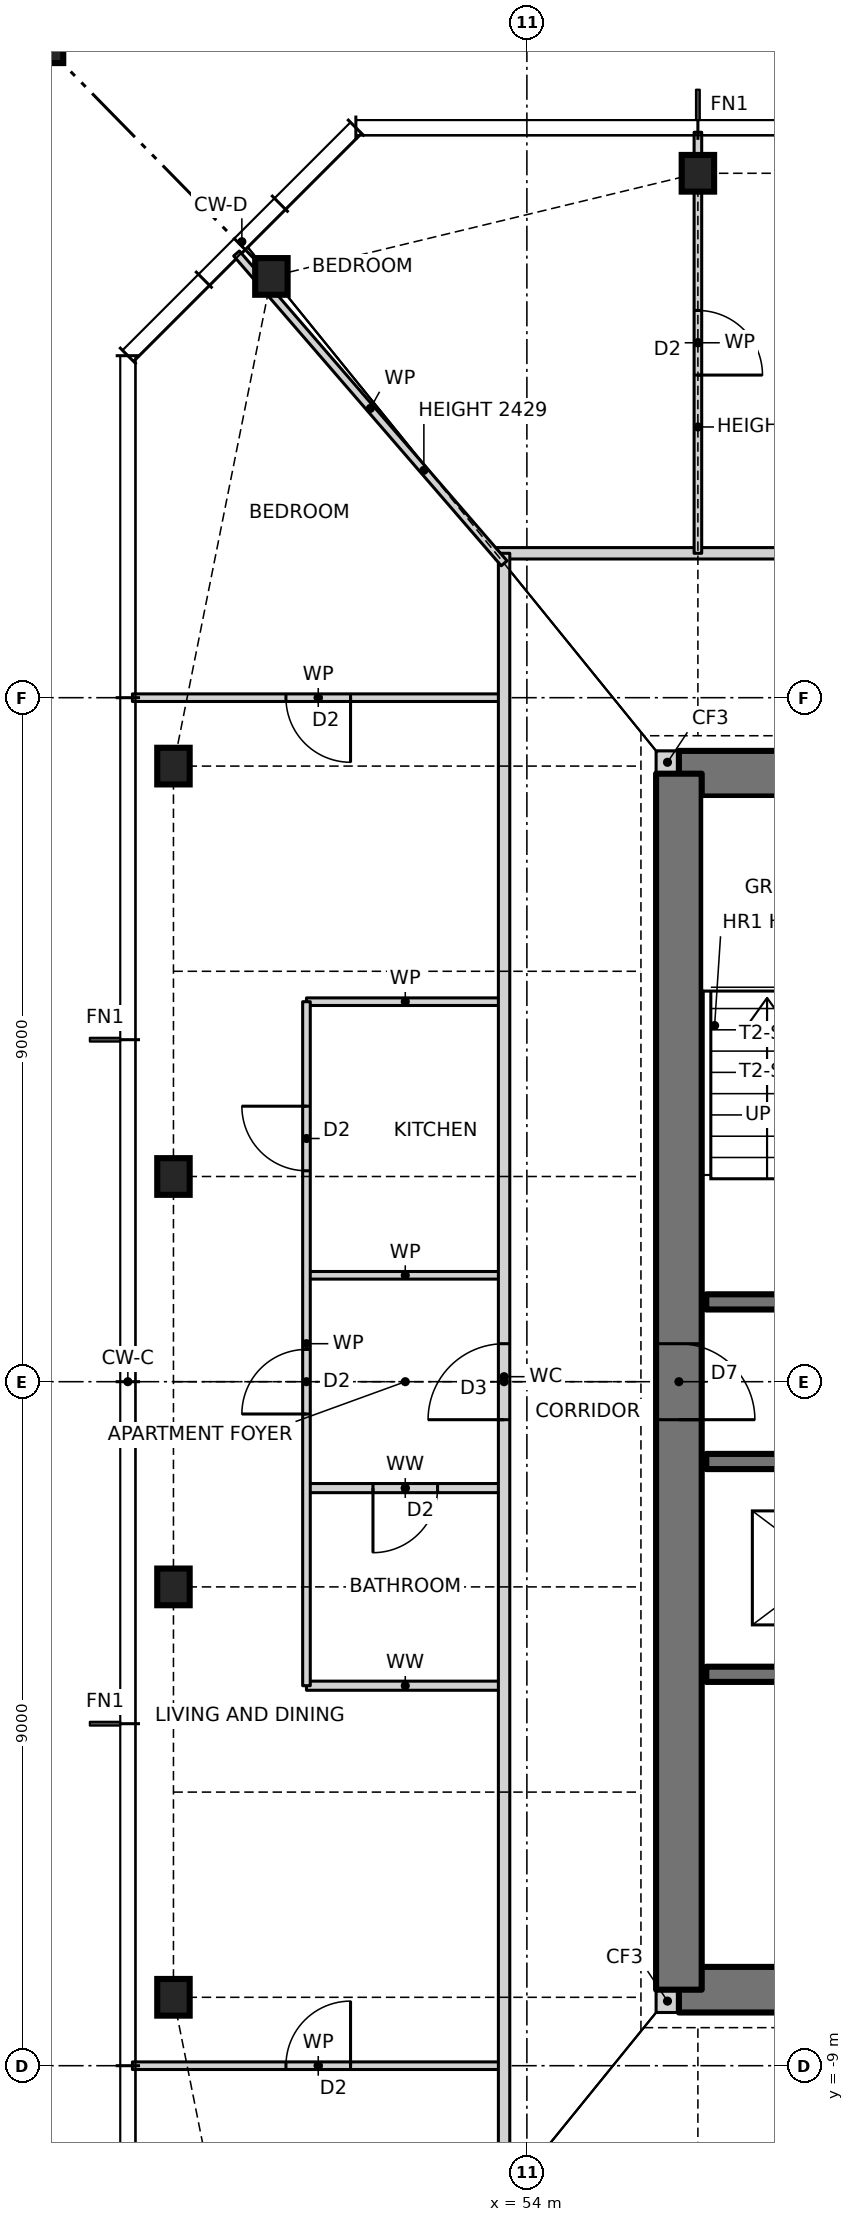
"""IFC4 building model, lengths in metres.
Left out: names, types, materials, properties, quantities, classifications, styles, units other than length and angle.
Written with IfcOpenShell. Run it as: python <this file> out.ifc"""

import sys

from ifc_helpers import new_model, si_unit, direction, frame, frame_2d, origin, origin_2d, place, context, subcontext, project, spatial, rectangle, hollow_rectangle, i_section, extrude, element, fill, save


model = new_model("IFC4")
c1 = context("Model", 3, precision=1e-05, world=origin(), true_north=direction((0.0, 1.0)))
c2 = subcontext(c1, "Body", "Model", "MODEL_VIEW")
j1 = project(units=[si_unit("LENGTHUNIT", "METRE"), si_unit("PLANEANGLEUNIT", "RADIAN")], contexts=[c1])
p1 = place(None, origin())
s1 = spatial("IfcSite", under=j1, at=p1, CompositionType="ELEMENT")
p2 = place(p1, origin())
s2 = spatial("IfcBuilding", under=s1, at=p2, CompositionType="ELEMENT")
p3 = place(p2, frame((0.0, 0.0, 101.5)))
s3 = spatial("IfcBuildingStorey", under=s2, at=p3, CompositionType="ELEMENT", Elevation=101.5)
for number, where, z_axis, x_axis in (
    (1, (56.25, 15.9, 0.0), (0.0, 0.0, 1.0), (1.0, 0.0, 0.0)),
    (2, (50.639, 14.543, 0.0), (0.0, 0.0, 1.0), (1.0, 0.0, 0.0)),
    (3, (49.35, 8.1, 0.0), (0.0, 0.0, 1.0), (1.0, 0.0, 0.0)),
    (4, (49.35, 2.7, 0.0), (0.0, 0.0, 1.0), (1.0, 0.0, 0.0)),
    (5, (49.35, -2.7, 0.0), (0.0, 0.0, 1.0), (1.0, 0.0, 0.0)),
    (6, (49.35, -8.1, 0.0), (0.0, 0.0, 1.0), (1.0, 0.0, 0.0)),
):
    element("IfcColumn", number, at=place(p3, frame(where, z_axis=z_axis, x_axis=x_axis)), inside=s3, PredefinedType="COLUMN", context=c2, shape_type="SweptSolid", body=[
        extrude(i_section(OverallWidth=0.427, OverallDepth=0.483, WebThickness=0.051, FlangeThickness=0.082, at=origin_2d()), origin(), (0.0, 0.0, 1.0), 3.5),
    ])
p4 = place(p3, frame((47.35, 17.9, 0.0), z_axis=(0.0, 0.0, 1.0), x_axis=(1.0, 0.0, 0.0)))
e7 = element("IfcColumn", 7, at=p4, inside=s3, PredefinedType="COLUMN", context=c2, shape_type="SweptSolid", body=[
    extrude(hollow_rectangle(XDim=1.1, YDim=1.1, WallThickness=0.06, at=origin_2d()), origin(), (0.0, 0.0, 1.0), 3.5),
])
for number, where, z_axis, x_axis in (
    (8, (55.7, -8.15, 0.0), (0.0, 0.0, 1.0), (1.0, 0.0, 0.0)),
    (9, (55.7, 8.15, 0.0), (0.0, 0.0, 1.0), (1.0, 0.0, 0.0)),
):
    element("IfcWall", number, at=place(p3, frame(where, z_axis=z_axis, x_axis=x_axis)), inside=s3, PredefinedType="SOLIDWALL", context=c2, shape_type="SweptSolid", body=[
        extrude(rectangle(XDim=0.3, YDim=0.3, at=frame_2d((0.15, 0.0))), origin(), (0.0, 0.0, 1.0), 3.5),
    ])
p5 = place(p3, frame((56.0, -8.0, 0.0), z_axis=(0.0, 0.0, 1.0), x_axis=(1.0, 0.0, 0.0)))
e10 = element("IfcWall", 10, at=p5, inside=s3, PredefinedType="SHEAR", context=c2, shape_type="SweptSolid", body=[
    extrude(rectangle(XDim=14.0, YDim=0.6, at=frame_2d((7.0, 0.0))), origin(), (0.0, 0.0, 1.0), 3.5),
])
p6 = place(p5, frame((2.7, 0.0, 0.0)))
e11 = element("IfcOpeningElement", 11, at=p6, cuts=e10, PredefinedType="OPENING", context=c2, shape_type="SweptSolid", body=[
    extrude(rectangle(XDim=0.9, YDim=2.1, at=frame_2d((0.45, 1.05))), frame((0.0, 0.31, 0.0), z_axis=(0.0, -1.0, 0.0), x_axis=(1.0, 0.0, 0.0)), (0.0, 0.0, 1.0), 0.62),
])
p7 = place(p5, frame((7.7, 0.0, 0.0)))
e12 = element("IfcOpeningElement", 12, at=p7, cuts=e10, PredefinedType="OPENING", context=c2, shape_type="SweptSolid", body=[
    extrude(rectangle(XDim=0.9, YDim=2.1, at=frame_2d((0.45, 1.05))), frame((0.0, 0.31, 0.0), z_axis=(0.0, -1.0, 0.0), x_axis=(1.0, 0.0, 0.0)), (0.0, 0.0, 1.0), 0.62),
])
p8 = place(p3, frame((70.0, 8.0, 0.0), z_axis=(0.0, 0.0, 1.0), x_axis=(-1.0, 0.0, 0.0)))
e13 = element("IfcWall", 13, at=p8, inside=s3, PredefinedType="SHEAR", context=c2, shape_type="SweptSolid", body=[
    extrude(rectangle(XDim=14.0, YDim=0.6, at=frame_2d((7.0, 0.0))), origin(), (0.0, 0.0, 1.0), 3.5),
])
p9 = place(p8, frame((8.2, 0.0, 0.0)))
e14 = element("IfcOpeningElement", 14, at=p9, cuts=e13, PredefinedType="OPENING", context=c2, shape_type="SweptSolid", body=[
    extrude(rectangle(XDim=0.9, YDim=2.1, at=frame_2d((0.45, 1.05))), frame((0.0, 0.31, 0.0), z_axis=(0.0, -1.0, 0.0), x_axis=(1.0, 0.0, 0.0)), (0.0, 0.0, 1.0), 0.62),
])
p10 = place(p8, frame((3.2, 0.0, 0.0)))
e15 = element("IfcOpeningElement", 15, at=p10, cuts=e13, PredefinedType="OPENING", context=c2, shape_type="SweptSolid", body=[
    extrude(rectangle(XDim=0.9, YDim=2.1, at=frame_2d((0.45, 1.05))), frame((0.0, 0.31, 0.0), z_axis=(0.0, -1.0, 0.0), x_axis=(1.0, 0.0, 0.0)), (0.0, 0.0, 1.0), 0.62),
])
p11 = place(p3, frame((56.0, 8.0, 0.0), z_axis=(0.0, 0.0, 1.0), x_axis=(0.0, -1.0, 0.0)))
e16 = element("IfcWall", 16, at=p11, inside=s3, PredefinedType="SHEAR", context=c2, shape_type="SweptSolid", body=[
    extrude(rectangle(XDim=16.0, YDim=0.6, at=frame_2d((8.0, 0.0))), origin(), (0.0, 0.0, 1.0), 3.5),
])
p12 = place(p11, frame((7.5, 0.0, 0.0)))
e17 = element("IfcOpeningElement", 17, at=p12, cuts=e16, PredefinedType="OPENING", context=c2, shape_type="SweptSolid", body=[
    extrude(rectangle(XDim=1.0, YDim=2.1, at=frame_2d((0.5, 1.05))), frame((0.0, 0.31, 0.0), z_axis=(0.0, -1.0, 0.0), x_axis=(1.0, 0.0, 0.0)), (0.0, 0.0, 1.0), 0.62),
])
p13 = place(p3, frame((48.81, -9.0, 0.0), z_axis=(0.0, 0.0, 1.0), x_axis=(1.0, 0.0, 0.0)))
e18 = element("IfcWall", 18, at=p13, inside=s3, PredefinedType="PARTITIONING", context=c2, shape_type="SweptSolid", body=[
    extrude(rectangle(XDim=4.89, YDim=0.1, at=frame_2d((2.445, 0.0))), origin(), (0.0, 0.0, 1.0), 3.27),
])
p14 = place(p13, frame((2.02, 0.0, 0.0)))
e19 = element("IfcOpeningElement", 19, at=p14, cuts=e18, PredefinedType="OPENING", context=c2, shape_type="SweptSolid", body=[
    extrude(rectangle(XDim=0.85, YDim=2.1, at=frame_2d((0.425, 1.05))), frame((0.0, 0.06, 0.0), z_axis=(0.0, -1.0, 0.0), x_axis=(1.0, 0.0, 0.0)), (0.0, 0.0, 1.0), 0.12),
])
p15 = place(p3, frame((51.1, -4.0, 0.0), z_axis=(0.0, 0.0, 1.0), x_axis=(1.0, 0.0, 0.0)))
e20 = element("IfcWall", 20, at=p15, inside=s3, PredefinedType="PARTITIONING", context=c2, shape_type="SweptSolid", body=[
    extrude(rectangle(XDim=2.6, YDim=0.12, at=frame_2d((1.3, 0.0))), origin(), (0.0, 0.0, 1.0), 3.27),
])
p16 = place(p3, frame((56.36, -3.85, 0.0), z_axis=(0.0, 0.0, 1.0), x_axis=(1.0, 0.0, 0.0)))
e21 = element("IfcWall", 21, at=p16, inside=s3, PredefinedType="SOLIDWALL", context=c2, shape_type="SweptSolid", body=[
    extrude(rectangle(XDim=9.94, YDim=0.2, at=frame_2d((4.97, 0.0))), origin(), (0.0, 0.0, 1.0), 3.5),
])
p17 = place(p3, frame((51.1, -1.4, 0.0), z_axis=(0.0, 0.0, 1.0), x_axis=(1.0, 0.0, 0.0)))
e22 = element("IfcWall", 22, at=p17, inside=s3, PredefinedType="PARTITIONING", context=c2, shape_type="SweptSolid", body=[
    extrude(rectangle(XDim=2.6, YDim=0.12, at=frame_2d((1.3, 0.0))), origin(), (0.0, 0.0, 1.0), 3.27),
])
p18 = place(p17, frame((0.875, 0.0, 0.0)))
e23 = element("IfcOpeningElement", 23, at=p18, cuts=e22, PredefinedType="OPENING", context=c2, shape_type="SweptSolid", body=[
    extrude(rectangle(XDim=0.85, YDim=2.1, at=frame_2d((0.425, 1.05))), frame((0.0, 0.07, 0.0), z_axis=(0.0, -1.0, 0.0), x_axis=(1.0, 0.0, 0.0)), (0.0, 0.0, 1.0), 0.14),
])
p19 = place(p3, frame((56.36, -1.05, 0.0), z_axis=(0.0, 0.0, 1.0), x_axis=(1.0, 0.0, 0.0)))
e24 = element("IfcWall", 24, at=p19, inside=s3, PredefinedType="SOLIDWALL", context=c2, shape_type="SweptSolid", body=[
    extrude(rectangle(XDim=13.28, YDim=0.2, at=frame_2d((6.64, 0.0))), origin(), (0.0, 0.0, 1.0), 3.5),
])
p20 = place(p19, frame((11.11, 0.0, 0.0)))
e25 = element("IfcOpeningElement", 25, at=p20, cuts=e24, PredefinedType="OPENING", context=c2, shape_type="SweptSolid", body=[
    extrude(rectangle(XDim=1.0, YDim=2.1, at=frame_2d((0.5, 1.05))), frame((0.0, 0.11, 0.0), z_axis=(0.0, -1.0, 0.0), x_axis=(1.0, 0.0, 0.0)), (0.0, 0.0, 1.0), 0.22),
])
p21 = place(p19, frame((1.087, 0.0, 0.0)))
e26 = element("IfcOpeningElement", 26, at=p21, cuts=e24, PredefinedType="OPENING", context=c2, shape_type="SweptSolid", body=[
    extrude(rectangle(XDim=1.1, YDim=2.1, at=frame_2d((0.55, 1.05))), frame((0.0, 0.11, 0.0), z_axis=(0.0, -1.0, 0.0), x_axis=(1.0, 0.0, 0.0)), (0.0, 0.0, 1.0), 0.22),
])
p22 = place(p19, frame((4.39, 0.0, 0.0)))
e27 = element("IfcOpeningElement", 27, at=p22, cuts=e24, PredefinedType="OPENING", context=c2, shape_type="SweptSolid", body=[
    extrude(rectangle(XDim=1.1, YDim=2.1, at=frame_2d((0.55, 1.05))), frame((0.0, 0.11, 0.0), z_axis=(0.0, -1.0, 0.0), x_axis=(1.0, 0.0, 0.0)), (0.0, 0.0, 1.0), 0.22),
])
p23 = place(p19, frame((7.724, 0.0, 0.0)))
e28 = element("IfcOpeningElement", 28, at=p23, cuts=e24, PredefinedType="OPENING", context=c2, shape_type="SweptSolid", body=[
    extrude(rectangle(XDim=1.1, YDim=2.1, at=frame_2d((0.55, 1.05))), frame((0.0, 0.11, 0.0), z_axis=(0.0, -1.0, 0.0), x_axis=(1.0, 0.0, 0.0)), (0.0, 0.0, 1.0), 0.22),
])
p24 = place(p3, frame((56.36, 1.05, 0.0), z_axis=(0.0, 0.0, 1.0), x_axis=(1.0, 0.0, 0.0)))
e29 = element("IfcWall", 29, at=p24, inside=s3, PredefinedType="SOLIDWALL", context=c2, shape_type="SweptSolid", body=[
    extrude(rectangle(XDim=13.28, YDim=0.2, at=frame_2d((6.64, 0.0))), origin(), (0.0, 0.0, 1.0), 3.5),
])
p25 = place(p24, frame((1.17, 0.0, 0.0)))
e30 = element("IfcOpeningElement", 30, at=p25, cuts=e29, PredefinedType="OPENING", context=c2, shape_type="SweptSolid", body=[
    extrude(rectangle(XDim=1.0, YDim=2.1, at=frame_2d((0.5, 1.05))), frame((0.0, 0.11, 0.0), z_axis=(0.0, -1.0, 0.0), x_axis=(1.0, 0.0, 0.0)), (0.0, 0.0, 1.0), 0.22),
])
p26 = place(p24, frame((5.14, 0.0, 0.0)))
e31 = element("IfcOpeningElement", 31, at=p26, cuts=e29, PredefinedType="OPENING", context=c2, shape_type="SweptSolid", body=[
    extrude(rectangle(XDim=0.9, YDim=2.1, at=frame_2d((0.45, 1.05))), frame((0.0, 0.11, 0.0), z_axis=(0.0, -1.0, 0.0), x_axis=(1.0, 0.0, 0.0)), (0.0, 0.0, 1.0), 0.22),
])
p27 = place(p24, frame((8.44, 0.0, 0.0)))
e32 = element("IfcOpeningElement", 32, at=p27, cuts=e29, PredefinedType="OPENING", context=c2, shape_type="SweptSolid", body=[
    extrude(rectangle(XDim=0.9, YDim=2.1, at=frame_2d((0.45, 1.05))), frame((0.0, 0.11, 0.0), z_axis=(0.0, -1.0, 0.0), x_axis=(1.0, 0.0, 0.0)), (0.0, 0.0, 1.0), 0.22),
])
p28 = place(p24, frame((10.96, 0.0, 0.0)))
e33 = element("IfcOpeningElement", 33, at=p28, cuts=e29, PredefinedType="OPENING", context=c2, shape_type="SweptSolid", body=[
    extrude(rectangle(XDim=1.3, YDim=2.1, at=frame_2d((0.65, 1.05))), frame((0.0, 0.11, 0.0), z_axis=(0.0, -1.0, 0.0), x_axis=(1.0, 0.0, 0.0)), (0.0, 0.0, 1.0), 0.22),
])
for number, where, z_axis, x_axis in (
    (34, (51.1, 1.4, 0.0), (0.0, 0.0, 1.0), (1.0, 0.0, 0.0)),
    (35, (51.1, 5.0, 0.0), (0.0, 0.0, 1.0), (1.0, 0.0, 0.0)),
):
    element("IfcWall", number, at=place(p3, frame(where, z_axis=z_axis, x_axis=x_axis)), inside=s3, PredefinedType="PARTITIONING", context=c2, shape_type="SweptSolid", body=[
        extrude(rectangle(XDim=2.6, YDim=0.1, at=frame_2d((1.3, 0.0))), origin(), (0.0, 0.0, 1.0), 3.27),
    ])
p29 = place(p3, frame((48.81, 9.0, 0.0), z_axis=(0.0, 0.0, 1.0), x_axis=(1.0, 0.0, 0.0)))
e36 = element("IfcWall", 36, at=p29, inside=s3, PredefinedType="PARTITIONING", context=c2, shape_type="SweptSolid", body=[
    extrude(rectangle(XDim=4.89, YDim=0.1, at=frame_2d((2.445, 0.0))), origin(), (0.0, 0.0, 1.0), 3.27),
])
p30 = place(p29, frame((2.02, 0.0, 0.0)))
e37 = element("IfcOpeningElement", 37, at=p30, cuts=e36, PredefinedType="OPENING", context=c2, shape_type="SweptSolid", body=[
    extrude(rectangle(XDim=0.85, YDim=2.1, at=frame_2d((0.425, 1.05))), frame((0.0, 0.06, 0.0), z_axis=(0.0, -1.0, 0.0), x_axis=(1.0, 0.0, 0.0)), (0.0, 0.0, 1.0), 0.12),
])
p31 = place(p3, frame((53.586, 10.9, 0.0), z_axis=(0.0, 0.0, 1.0), x_axis=(1.0, 0.0, 0.0)))
e38 = element("IfcWall", 38, at=p31, inside=s3, PredefinedType="PARTITIONING", context=c2, shape_type="SweptSolid", body=[
    extrude(rectangle(XDim=18.828, YDim=0.15, at=frame_2d((9.414, 0.0))), origin(), (0.0, 0.0, 1.0), 3.27),
])
p32 = place(p31, frame((8.914, 0.0, 0.0)))
e39 = element("IfcOpeningElement", 39, at=p32, cuts=e38, PredefinedType="OPENING", context=c2, shape_type="SweptSolid", body=[
    extrude(rectangle(XDim=1.0, YDim=2.1, at=frame_2d((0.5, 1.05))), frame((0.0, 0.085, 0.0), z_axis=(0.0, -1.0, 0.0), x_axis=(1.0, 0.0, 0.0)), (0.0, 0.0, 1.0), 0.17),
])
p33 = place(p3, frame((56.25, 10.9, 0.0), z_axis=(0.0, 0.0, 1.0), x_axis=(0.0, 1.0, 0.0)))
e40 = element("IfcWall", 40, at=p33, inside=s3, PredefinedType="PARTITIONING", context=c2, shape_type="SweptSolid", body=[
    extrude(rectangle(XDim=5.54, YDim=0.1, at=frame_2d((2.77, 0.0))), origin(), (0.0, 0.0, 1.0), 2.587),
])
p34 = place(p33, frame((2.345, 0.0, 0.0)))
e41 = element("IfcOpeningElement", 41, at=p34, cuts=e40, PredefinedType="OPENING", context=c2, shape_type="SweptSolid", body=[
    extrude(rectangle(XDim=0.85, YDim=2.1, at=frame_2d((0.425, 1.05))), frame((0.0, 0.06, 0.0), z_axis=(0.0, -1.0, 0.0), x_axis=(1.0, 0.0, 0.0)), (0.0, 0.0, 1.0), 0.12),
])
p35 = place(p3, frame((53.7, -10.768, 0.0), z_axis=(0.0, 0.0, 1.0), x_axis=(0.0, 1.0, 0.0)))
e42 = element("IfcWall", 42, at=p35, inside=s3, PredefinedType="PARTITIONING", context=c2, shape_type="SweptSolid", body=[
    extrude(rectangle(XDim=21.668, YDim=0.15, at=frame_2d((10.834, 0.0))), origin(), (0.0, 0.0, 1.0), 3.27),
])
p36 = place(p35, frame((10.268, 0.0, 0.0)))
e43 = element("IfcOpeningElement", 43, at=p36, cuts=e42, PredefinedType="OPENING", context=c2, shape_type="SweptSolid", body=[
    extrude(rectangle(XDim=1.0, YDim=2.1, at=frame_2d((0.5, 1.05))), frame((0.0, 0.085, 0.0), z_axis=(0.0, -1.0, 0.0), x_axis=(1.0, 0.0, 0.0)), (0.0, 0.0, 1.0), 0.17),
])
p37 = place(p3, frame((51.1, -4.0, 0.0), z_axis=(0.0, 0.0, 1.0), x_axis=(0.0, 1.0, 0.0)))
e44 = element("IfcWall", 44, at=p37, inside=s3, PredefinedType="PARTITIONING", context=c2, shape_type="SweptSolid", body=[
    extrude(rectangle(XDim=9.0, YDim=0.1, at=frame_2d((4.5, 0.0))), origin(), (0.0, 0.0, 1.0), 3.27),
])
p38 = place(p37, frame((6.775, 0.0, 0.0)))
e45 = element("IfcOpeningElement", 45, at=p38, cuts=e44, PredefinedType="OPENING", context=c2, shape_type="SweptSolid", body=[
    extrude(rectangle(XDim=0.85, YDim=2.1, at=frame_2d((0.425, 1.05))), frame((0.0, 0.06, 0.0), z_axis=(0.0, -1.0, 0.0), x_axis=(1.0, 0.0, 0.0)), (0.0, 0.0, 1.0), 0.12),
])
p39 = place(p37, frame((3.575, 0.0, 0.0)))
e46 = element("IfcOpeningElement", 46, at=p39, cuts=e44, PredefinedType="OPENING", context=c2, shape_type="SweptSolid", body=[
    extrude(rectangle(XDim=0.85, YDim=2.1, at=frame_2d((0.425, 1.05))), frame((0.0, 0.06, 0.0), z_axis=(0.0, -1.0, 0.0), x_axis=(1.0, 0.0, 0.0)), (0.0, 0.0, 1.0), 0.12),
])
p40 = place(p3, frame((53.701, 10.768, 0.0), z_axis=(0.0, 0.0, 1.0), x_axis=(-0.653623410225, 0.756819950586, 0.0)))
e47 = element("IfcWall", 47, at=p40, inside=s3, PredefinedType="PARTITIONING", context=c2, shape_type="SweptSolid", body=[
    extrude(rectangle(XDim=5.387, YDim=0.1, at=frame_2d((2.693, 0.0))), origin(), (0.0, 0.0, 1.0), 2.429),
])
p41 = place(p34, frame((0.85, 0.0, 0.0), z_axis=(0.0, 0.0, 1.0), x_axis=(-1.0, 0.0, 0.0)))
e48 = element("IfcDoor", 48, at=p41, inside=s3, OperationType="SINGLE_SWING_RIGHT", PredefinedType="DOOR", context=c2, shape_type="SweptSolid", body=[
    extrude(rectangle(XDim=0.85, YDim=2.1, at=frame_2d((0.425, 1.05))), frame((0.0, 0.025, 0.0), z_axis=(0.0, -1.0, 0.0), x_axis=(1.0, 0.0, 0.0)), (0.0, 0.0, 1.0), 0.05),
])
fill(e41, e48)
p42 = place(p38, origin())
e49 = element("IfcDoor", 49, at=p42, inside=s3, OperationType="SINGLE_SWING_RIGHT", PredefinedType="DOOR", context=c2, shape_type="SweptSolid", body=[
    extrude(rectangle(XDim=0.85, YDim=2.1, at=frame_2d((0.425, 1.05))), frame((0.0, 0.025, 0.0), z_axis=(0.0, -1.0, 0.0), x_axis=(1.0, 0.0, 0.0)), (0.0, 0.0, 1.0), 0.05),
])
fill(e45, e49)
p43 = place(p36, origin())
e50 = element("IfcDoor", 50, at=p43, inside=s3, OperationType="SINGLE_SWING_LEFT", PredefinedType="DOOR", context=c2, shape_type="SweptSolid", body=[
    extrude(rectangle(XDim=1.0, YDim=2.1, at=frame_2d((0.5, 1.05))), frame((0.0, 0.025, 0.0), z_axis=(0.0, -1.0, 0.0), x_axis=(1.0, 0.0, 0.0)), (0.0, 0.0, 1.0), 0.05),
])
fill(e43, e50)
p44 = place(p39, origin())
e51 = element("IfcDoor", 51, at=p44, inside=s3, OperationType="SINGLE_SWING_LEFT", PredefinedType="DOOR", context=c2, shape_type="SweptSolid", body=[
    extrude(rectangle(XDim=0.85, YDim=2.1, at=frame_2d((0.425, 1.05))), frame((0.0, 0.025, 0.0), z_axis=(0.0, -1.0, 0.0), x_axis=(1.0, 0.0, 0.0)), (0.0, 0.0, 1.0), 0.05),
])
fill(e46, e51)
p45 = place(p18, frame((0.85, 0.0, 0.0), z_axis=(0.0, 0.0, 1.0), x_axis=(-1.0, 0.0, 0.0)))
e52 = element("IfcDoor", 52, at=p45, inside=s3, OperationType="SINGLE_SWING_RIGHT", PredefinedType="DOOR", context=c2, shape_type="SweptSolid", body=[
    extrude(rectangle(XDim=0.85, YDim=2.1, at=frame_2d((0.425, 1.05))), frame((0.0, 0.025, 0.0), z_axis=(0.0, -1.0, 0.0), x_axis=(1.0, 0.0, 0.0)), (0.0, 0.0, 1.0), 0.05),
])
fill(e23, e52)
p46 = place(p30, frame((0.85, 0.0, 0.0), z_axis=(0.0, 0.0, 1.0), x_axis=(-1.0, 0.0, 0.0)))
e53 = element("IfcDoor", 53, at=p46, inside=s3, OperationType="SINGLE_SWING_LEFT", PredefinedType="DOOR", context=c2, shape_type="SweptSolid", body=[
    extrude(rectangle(XDim=0.85, YDim=2.1, at=frame_2d((0.425, 1.05))), frame((0.0, 0.025, 0.0), z_axis=(0.0, -1.0, 0.0), x_axis=(1.0, 0.0, 0.0)), (0.0, 0.0, 1.0), 0.05),
])
fill(e37, e53)
p47 = place(p14, origin())
e54 = element("IfcDoor", 54, at=p47, inside=s3, OperationType="SINGLE_SWING_RIGHT", PredefinedType="DOOR", context=c2, shape_type="SweptSolid", body=[
    extrude(rectangle(XDim=0.85, YDim=2.1, at=frame_2d((0.425, 1.05))), frame((0.0, 0.025, 0.0), z_axis=(0.0, -1.0, 0.0), x_axis=(1.0, 0.0, 0.0)), (0.0, 0.0, 1.0), 0.05),
])
fill(e19, e54)
p48 = place(p12, origin())
e55 = element("IfcDoor", 55, at=p48, inside=s3, OperationType="SINGLE_SWING_RIGHT", PredefinedType="DOOR", context=c2, shape_type="SweptSolid", body=[
    extrude(rectangle(XDim=1.0, YDim=2.1, at=frame_2d((0.5, 1.05))), frame((0.0, 0.025, 0.0), z_axis=(0.0, -1.0, 0.0), x_axis=(1.0, 0.0, 0.0)), (0.0, 0.0, 1.0), 0.05),
])
fill(e17, e55)
save(model, sys.argv[1])
